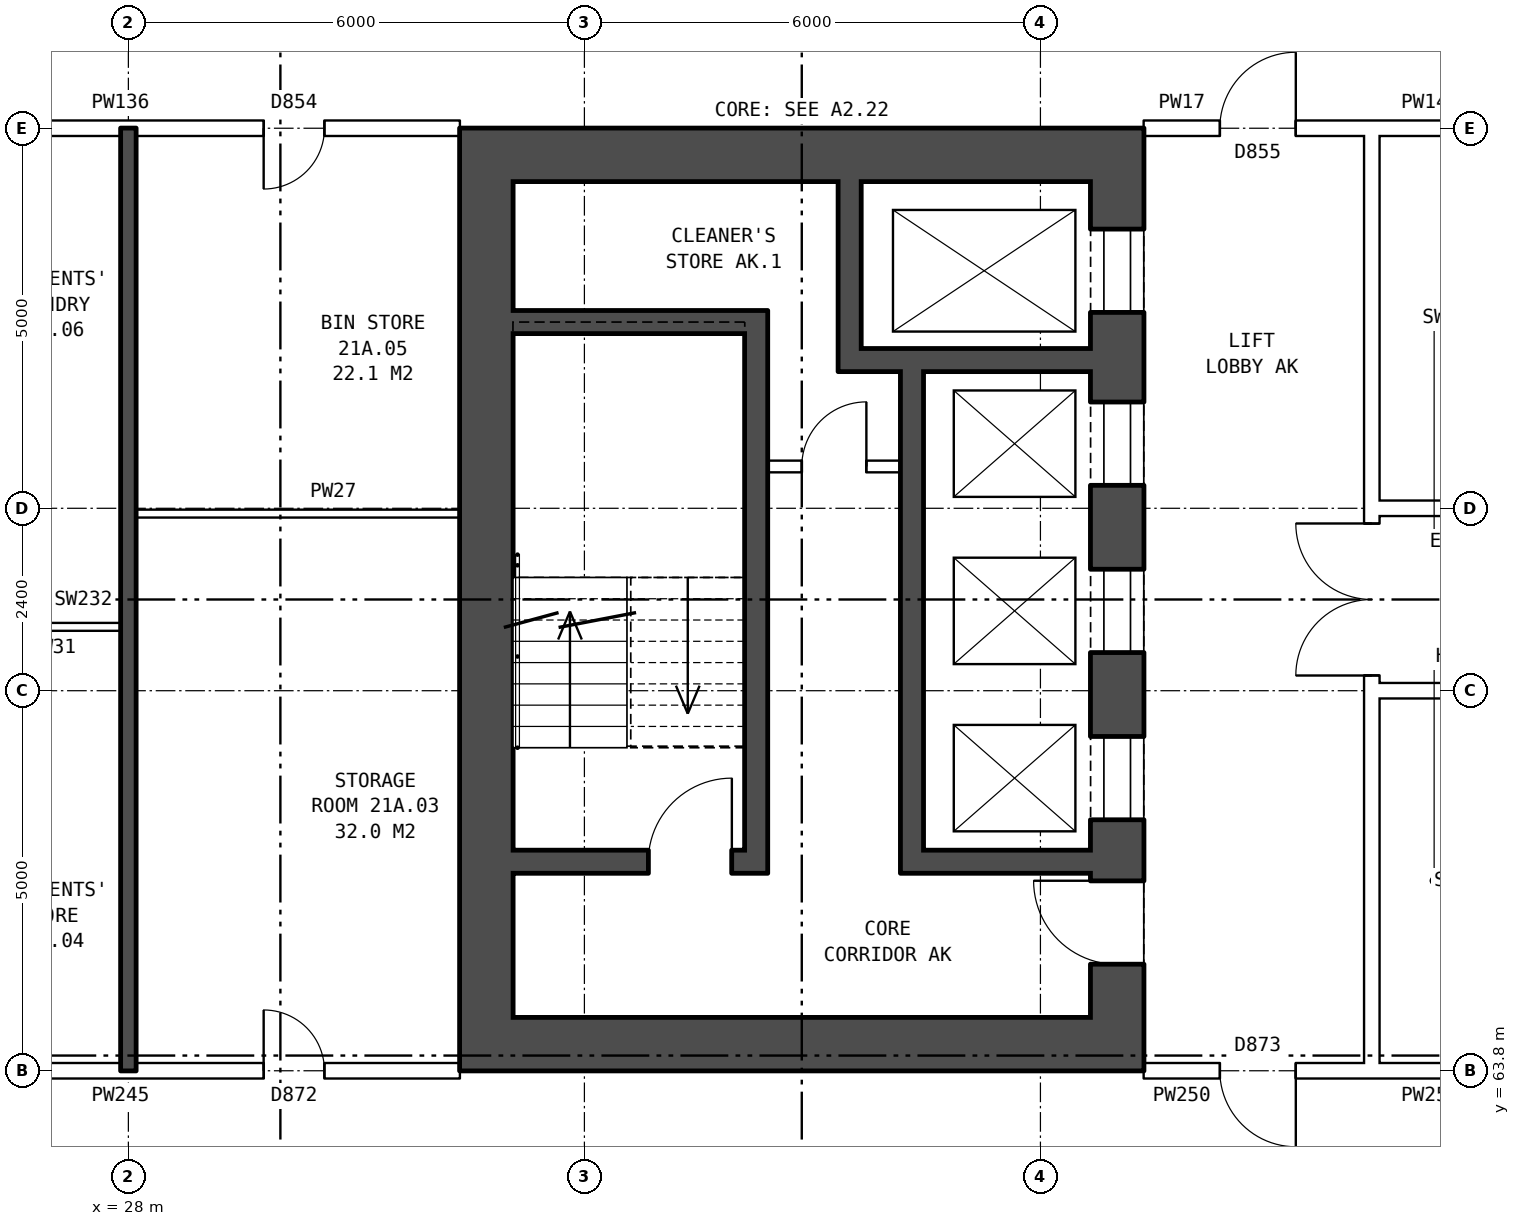
"""IFC4 building model, lengths in metres.
Left out: names, types, materials, properties, quantities, classifications, styles, units other than length and angle.
Written with IfcOpenShell. Run it as: python <this file> out.ifc"""

import sys

from ifc_helpers import new_model, si_unit, direction, frame, frame_2d, origin, place, context, subcontext, project, spatial, rectangle, extrude, element, fill, save


model = new_model("IFC4")
c1 = context("Model", 3, precision=1e-05, world=origin(), true_north=direction((0.0, 1.0)))
c2 = subcontext(c1, "Body", "Model", "MODEL_VIEW")
j1 = project(units=[si_unit("LENGTHUNIT", "METRE"), si_unit("PLANEANGLEUNIT", "RADIAN")], contexts=[c1])
p1 = place(None, origin())
s1 = spatial("IfcSite", under=j1, at=p1, CompositionType="ELEMENT")
p2 = place(p1, origin())
s2 = spatial("IfcBuilding", under=s1, at=p2, CompositionType="ELEMENT")
p3 = place(p2, frame((0.0, 0.0, 77.8)))
s3 = spatial("IfcBuildingStorey", under=s2, at=p3, CompositionType="ELEMENT", Elevation=77.8)
p4 = place(p3, frame((41.01, 75.5, 0.0), z_axis=(0.0, 0.0, 1.0), x_axis=(0.0, -1.0, 0.0)))
e1 = element("IfcWall", 1, at=p4, inside=s3, PredefinedType="SHEAR", context=c2, shape_type="SweptSolid", body=[
    extrude(rectangle(XDim=11.0, YDim=0.7, at=frame_2d((5.5, 0.0))), origin(), (0.0, 0.0, 1.0), 2.85),
])
p5 = place(p4, frame((0.625, 0.0, 0.0)))
e2 = element("IfcOpeningElement", 2, at=p5, cuts=e1, PredefinedType="OPENING", context=c2, shape_type="SweptSolid", body=[
    extrude(rectangle(XDim=1.1, YDim=2.1, at=frame_2d((0.55, 1.05))), frame((0.0, 0.36, 0.0), z_axis=(0.0, -1.0, 0.0), x_axis=(1.0, 0.0, 0.0)), (0.0, 0.0, 1.0), 0.72),
])
p6 = place(p4, frame((2.9, 0.0, 0.0)))
e3 = element("IfcOpeningElement", 3, at=p6, cuts=e1, PredefinedType="OPENING", context=c2, shape_type="SweptSolid", body=[
    extrude(rectangle(XDim=1.1, YDim=2.1, at=frame_2d((0.55, 1.05))), frame((0.0, 0.36, 0.0), z_axis=(0.0, -1.0, 0.0), x_axis=(1.0, 0.0, 0.0)), (0.0, 0.0, 1.0), 0.72),
])
p7 = place(p4, frame((5.1, 0.0, 0.0)))
e4 = element("IfcOpeningElement", 4, at=p7, cuts=e1, PredefinedType="OPENING", context=c2, shape_type="SweptSolid", body=[
    extrude(rectangle(XDim=1.1, YDim=2.1, at=frame_2d((0.55, 1.05))), frame((0.0, 0.36, 0.0), z_axis=(0.0, -1.0, 0.0), x_axis=(1.0, 0.0, 0.0)), (0.0, 0.0, 1.0), 0.72),
])
p8 = place(p4, frame((7.3, 0.0, 0.0)))
e5 = element("IfcOpeningElement", 5, at=p8, cuts=e1, PredefinedType="OPENING", context=c2, shape_type="SweptSolid", body=[
    extrude(rectangle(XDim=1.1, YDim=2.1, at=frame_2d((0.55, 1.05))), frame((0.0, 0.36, 0.0), z_axis=(0.0, -1.0, 0.0), x_axis=(1.0, 0.0, 0.0)), (0.0, 0.0, 1.0), 0.72),
])
p9 = place(p4, frame((9.2, 0.0, 0.0)))
e6 = element("IfcOpeningElement", 6, at=p9, cuts=e1, PredefinedType="OPENING", context=c2, shape_type="SweptSolid", body=[
    extrude(rectangle(XDim=1.1, YDim=2.1, at=frame_2d((0.55, 1.05))), frame((0.0, 0.36, 0.0), z_axis=(0.0, -1.0, 0.0), x_axis=(1.0, 0.0, 0.0)), (0.0, 0.0, 1.0), 0.72),
])
p10 = place(p3, frame((32.71, 75.5, 0.0), z_axis=(0.0, 0.0, 1.0), x_axis=(0.0, -1.0, 0.0)))
e7 = element("IfcWall", 7, at=p10, inside=s3, PredefinedType="SHEAR", context=c2, shape_type="SweptSolid", body=[
    extrude(rectangle(XDim=11.0, YDim=0.7, at=frame_2d((5.5, 0.0))), origin(), (0.0, 0.0, 1.0), 2.85),
])
for number, where, z_axis, x_axis in (
    (8, (41.36, 75.85, 0.0), (0.0, 0.0, 1.0), (-1.0, 0.0, 0.0)),
    (9, (41.36, 64.15, 0.0), (0.0, 0.0, 1.0), (-1.0, 0.0, 0.0)),
):
    element("IfcWall", number, at=place(p3, frame(where, z_axis=z_axis, x_axis=x_axis)), inside=s3, PredefinedType="SHEAR", context=c2, shape_type="SweptSolid", body=[
        extrude(rectangle(XDim=9.0, YDim=0.7, at=frame_2d((4.5, 0.0))), origin(), (0.0, 0.0, 1.0), 2.85),
    ])
p11 = place(p3, frame((36.11, 73.65, 0.0), z_axis=(0.0, 0.0, 1.0), x_axis=(-1.0, 0.0, 0.0)))
e10 = element("IfcWall", 10, at=p11, inside=s3, PredefinedType="SHEAR", context=c2, shape_type="SweptSolid", body=[
    extrude(rectangle(XDim=3.05, YDim=0.3, at=frame_2d((1.525, 0.0))), origin(), (0.0, 0.0, 1.0), 2.85),
])
p12 = place(p3, frame((40.66, 73.15, 0.0), z_axis=(0.0, 0.0, 1.0), x_axis=(-1.0, 0.0, 0.0)))
e11 = element("IfcWall", 11, at=p12, inside=s3, PredefinedType="SHEAR", context=c2, shape_type="SweptSolid", body=[
    extrude(rectangle(XDim=3.32, YDim=0.3, at=frame_2d((1.66, 0.0))), origin(), (0.0, 0.0, 1.0), 2.85),
])
p13 = place(p3, frame((38.16, 71.75, 0.0), z_axis=(0.0, 0.0, 1.0), x_axis=(-1.0, 0.0, 0.0)))
e12 = element("IfcWall", 12, at=p13, inside=s3, PredefinedType="PARTITIONING", context=c2, shape_type="SweptSolid", body=[
    extrude(rectangle(XDim=1.75, YDim=0.15, at=frame_2d((0.875, 0.0))), origin(), (0.0, 0.0, 1.0), 2.85),
])
p14 = place(p13, frame((0.45, 0.0, 0.0)))
e13 = element("IfcOpeningElement", 13, at=p14, cuts=e12, PredefinedType="OPENING", context=c2, shape_type="SweptSolid", body=[
    extrude(rectangle(XDim=0.85, YDim=2.1, at=frame_2d((0.425, 1.05))), frame((0.0, 0.085, 0.0), z_axis=(0.0, -1.0, 0.0), x_axis=(1.0, 0.0, 0.0)), (0.0, 0.0, 1.0), 0.17),
])
p15 = place(p3, frame((40.66, 66.55, 0.0), z_axis=(0.0, 0.0, 1.0), x_axis=(-1.0, 0.0, 0.0)))
e14 = element("IfcWall", 14, at=p15, inside=s3, PredefinedType="SHEAR", context=c2, shape_type="SweptSolid", body=[
    extrude(rectangle(XDim=2.2, YDim=0.3, at=frame_2d((1.1, 0.0))), origin(), (0.0, 0.0, 1.0), 2.85),
])
p16 = place(p3, frame((36.11, 66.55, 0.0), z_axis=(0.0, 0.0, 1.0), x_axis=(-1.0, 0.0, 0.0)))
e15 = element("IfcWall", 15, at=p16, inside=s3, PredefinedType="SHEAR", context=c2, shape_type="SweptSolid", body=[
    extrude(rectangle(XDim=3.05, YDim=0.3, at=frame_2d((1.525, 0.0))), origin(), (0.0, 0.0, 1.0), 2.85),
])
p17 = place(p16, frame((0.17, 0.0, 0.0)))
e16 = element("IfcOpeningElement", 16, at=p17, cuts=e15, PredefinedType="OPENING", context=c2, shape_type="SweptSolid", body=[
    extrude(rectangle(XDim=1.1, YDim=2.1, at=frame_2d((0.55, 1.05))), frame((0.0, 0.16, 0.0), z_axis=(0.0, -1.0, 0.0), x_axis=(1.0, 0.0, 0.0)), (0.0, 0.0, 1.0), 0.32),
])
p18 = place(p3, frame((38.31, 73.0, 0.0), z_axis=(0.0, 0.0, 1.0), x_axis=(0.0, -1.0, 0.0)))
e17 = element("IfcWall", 17, at=p18, inside=s3, PredefinedType="SHEAR", context=c2, shape_type="SweptSolid", body=[
    extrude(rectangle(XDim=6.6, YDim=0.3, at=frame_2d((3.3, 0.0))), origin(), (0.0, 0.0, 1.0), 2.85),
])
p19 = place(p3, frame((37.49, 75.5, 0.0), z_axis=(0.0, 0.0, 1.0), x_axis=(0.0, -1.0, 0.0)))
e18 = element("IfcWall", 18, at=p19, inside=s3, PredefinedType="SHEAR", context=c2, shape_type="SweptSolid", body=[
    extrude(rectangle(XDim=2.2, YDim=0.3, at=frame_2d((1.1, 0.0))), origin(), (0.0, 0.0, 1.0), 2.85),
])
p20 = place(p3, frame((36.26, 73.8, 0.0), z_axis=(0.0, 0.0, 1.0), x_axis=(0.0, -1.0, 0.0)))
e19 = element("IfcWall", 19, at=p20, inside=s3, PredefinedType="SHEAR", context=c2, shape_type="SweptSolid", body=[
    extrude(rectangle(XDim=7.4, YDim=0.3, at=frame_2d((3.7, 0.0))), origin(), (0.0, 0.0, 1.0), 2.85),
])
p21 = place(p3, frame((44.36, 63.9, 0.0), z_axis=(0.0, 0.0, 1.0), x_axis=(0.0, 1.0, 0.0)))
e20 = element("IfcWall", 20, at=p21, inside=s3, PredefinedType="PARTITIONING", context=c2, shape_type="SweptSolid", body=[
    extrude(rectangle(XDim=12.2, YDim=0.2, at=frame_2d((6.1, 0.0))), origin(), (0.0, 0.0, 1.0), 2.85),
])
p22 = place(p21, frame((5.1, 0.0, 0.0)))
e21 = element("IfcOpeningElement", 21, at=p22, cuts=e20, PredefinedType="OPENING", context=c2, shape_type="SweptSolid", body=[
    extrude(rectangle(XDim=2.0, YDim=2.1, at=frame_2d((1.0, 1.05))), frame((0.0, 0.11, 0.0), z_axis=(0.0, -1.0, 0.0), x_axis=(1.0, 0.0, 0.0)), (0.0, 0.0, 1.0), 0.22),
])
p23 = place(p3, frame((26.01, 63.8, 0.0), z_axis=(0.0, 0.0, 1.0), x_axis=(1.0, 0.0, 0.0)))
e22 = element("IfcWall", 22, at=p23, inside=s3, PredefinedType="PARTITIONING", context=c2, shape_type="SweptSolid", body=[
    extrude(rectangle(XDim=6.35, YDim=0.2, at=frame_2d((3.175, 0.0))), origin(), (0.0, 0.0, 1.0), 2.85),
])
p24 = place(p23, frame((3.77, 0.0, 0.0)))
e23 = element("IfcOpeningElement", 23, at=p24, cuts=e22, PredefinedType="OPENING", context=c2, shape_type="SweptSolid", body=[
    extrude(rectangle(XDim=0.8, YDim=2.1, at=frame_2d((0.4, 1.05))), frame((0.0, 0.11, 0.0), z_axis=(0.0, -1.0, 0.0), x_axis=(1.0, 0.0, 0.0)), (0.0, 0.0, 1.0), 0.22),
])
p25 = place(p3, frame((41.36, 63.8, 0.0), z_axis=(0.0, 0.0, 1.0), x_axis=(1.0, 0.0, 0.0)))
e24 = element("IfcWall", 24, at=p25, inside=s3, PredefinedType="PARTITIONING", context=c2, shape_type="SweptSolid", body=[
    extrude(rectangle(XDim=3.0, YDim=0.2, at=frame_2d((1.5, 0.0))), origin(), (0.0, 0.0, 1.0), 2.85),
])
p26 = place(p25, frame((1.0, 0.0, 0.0)))
e25 = element("IfcOpeningElement", 25, at=p26, cuts=e24, PredefinedType="OPENING", context=c2, shape_type="SweptSolid", body=[
    extrude(rectangle(XDim=1.0, YDim=2.1, at=frame_2d((0.5, 1.05))), frame((0.0, 0.11, 0.0), z_axis=(0.0, -1.0, 0.0), x_axis=(1.0, 0.0, 0.0)), (0.0, 0.0, 1.0), 0.22),
])
p27 = place(p3, frame((44.36, 63.8, 0.0), z_axis=(0.0, 0.0, 1.0), x_axis=(1.0, 0.0, 0.0)))
e26 = element("IfcWall", 26, at=p27, inside=s3, PredefinedType="PARTITIONING", context=c2, shape_type="SweptSolid", body=[
    extrude(rectangle(XDim=1.54, YDim=0.2, at=frame_2d((0.77, 0.0))), origin(), (0.0, 0.0, 1.0), 2.85),
])
p28 = place(p3, frame((44.36, 68.8, 0.0), z_axis=(0.0, 0.0, 1.0), x_axis=(1.0, 0.0, 0.0)))
e27 = element("IfcWall", 27, at=p28, inside=s3, PredefinedType="PARTITIONING", context=c2, shape_type="SweptSolid", body=[
    extrude(rectangle(XDim=19.28, YDim=0.2, at=frame_2d((9.64, 0.0))), origin(), (0.0, 0.0, 1.0), 2.85),
])
p29 = place(p28, frame((14.64, 0.0, 0.0)))
e28 = element("IfcOpeningElement", 28, at=p29, cuts=e27, PredefinedType="OPENING", context=c2, shape_type="SweptSolid", body=[
    extrude(rectangle(XDim=1.0, YDim=2.1, at=frame_2d((0.5, 1.05))), frame((0.0, 0.11, 0.0), z_axis=(0.0, -1.0, 0.0), x_axis=(1.0, 0.0, 0.0)), (0.0, 0.0, 1.0), 0.22),
])
p30 = place(p28, frame((5.64, 0.0, 0.0)))
e29 = element("IfcOpeningElement", 29, at=p30, cuts=e27, PredefinedType="OPENING", context=c2, shape_type="SweptSolid", body=[
    extrude(rectangle(XDim=1.0, YDim=2.1, at=frame_2d((0.5, 1.05))), frame((0.0, 0.11, 0.0), z_axis=(0.0, -1.0, 0.0), x_axis=(1.0, 0.0, 0.0)), (0.0, 0.0, 1.0), 0.22),
])
p31 = place(p3, frame((26.11, 69.64, 0.0), z_axis=(0.0, 0.0, 1.0), x_axis=(1.0, 0.0, 0.0)))
e30 = element("IfcWall", 30, at=p31, inside=s3, PredefinedType="PARTITIONING", context=c2, shape_type="SweptSolid", body=[
    extrude(rectangle(XDim=1.79, YDim=0.1, at=frame_2d((0.895, 0.0))), origin(), (0.0, 0.0, 1.0), 2.85),
])
p32 = place(p3, frame((28.1, 71.13, 0.0), z_axis=(0.0, 0.0, 1.0), x_axis=(1.0, 0.0, 0.0)))
e31 = element("IfcWall", 31, at=p32, inside=s3, PredefinedType="PARTITIONING", context=c2, shape_type="SweptSolid", body=[
    extrude(rectangle(XDim=4.26, YDim=0.1, at=frame_2d((2.13, 0.0))), origin(), (0.0, 0.0, 1.0), 2.85),
])
p33 = place(p3, frame((44.36, 71.2, 0.0), z_axis=(0.0, 0.0, 1.0), x_axis=(1.0, 0.0, 0.0)))
e32 = element("IfcWall", 32, at=p33, inside=s3, PredefinedType="PARTITIONING", context=c2, shape_type="SweptSolid", body=[
    extrude(rectangle(XDim=19.28, YDim=0.2, at=frame_2d((9.64, 0.0))), origin(), (0.0, 0.0, 1.0), 2.85),
])
p34 = place(p33, frame((14.64, 0.0, 0.0)))
e33 = element("IfcOpeningElement", 33, at=p34, cuts=e32, PredefinedType="OPENING", context=c2, shape_type="SweptSolid", body=[
    extrude(rectangle(XDim=1.0, YDim=2.1, at=frame_2d((0.5, 1.05))), frame((0.0, 0.11, 0.0), z_axis=(0.0, -1.0, 0.0), x_axis=(1.0, 0.0, 0.0)), (0.0, 0.0, 1.0), 0.22),
])
p35 = place(p33, frame((5.64, 0.0, 0.0)))
e34 = element("IfcOpeningElement", 34, at=p35, cuts=e32, PredefinedType="OPENING", context=c2, shape_type="SweptSolid", body=[
    extrude(rectangle(XDim=1.0, YDim=2.1, at=frame_2d((0.5, 1.05))), frame((0.0, 0.11, 0.0), z_axis=(0.0, -1.0, 0.0), x_axis=(1.0, 0.0, 0.0)), (0.0, 0.0, 1.0), 0.22),
])
p36 = place(p3, frame((26.01, 76.2, 0.0), z_axis=(0.0, 0.0, 1.0), x_axis=(1.0, 0.0, 0.0)))
e35 = element("IfcWall", 35, at=p36, inside=s3, PredefinedType="PARTITIONING", context=c2, shape_type="SweptSolid", body=[
    extrude(rectangle(XDim=6.35, YDim=0.2, at=frame_2d((3.175, 0.0))), origin(), (0.0, 0.0, 1.0), 2.85),
])
p37 = place(p36, frame((3.77, 0.0, 0.0)))
e36 = element("IfcOpeningElement", 36, at=p37, cuts=e35, PredefinedType="OPENING", context=c2, shape_type="SweptSolid", body=[
    extrude(rectangle(XDim=0.8, YDim=2.1, at=frame_2d((0.4, 1.05))), frame((0.0, 0.11, 0.0), z_axis=(0.0, -1.0, 0.0), x_axis=(1.0, 0.0, 0.0)), (0.0, 0.0, 1.0), 0.22),
])
p38 = place(p3, frame((41.36, 76.2, 0.0), z_axis=(0.0, 0.0, 1.0), x_axis=(1.0, 0.0, 0.0)))
e37 = element("IfcWall", 37, at=p38, inside=s3, PredefinedType="PARTITIONING", context=c2, shape_type="SweptSolid", body=[
    extrude(rectangle(XDim=3.0, YDim=0.2, at=frame_2d((1.5, 0.0))), origin(), (0.0, 0.0, 1.0), 2.85),
])
p39 = place(p38, frame((1.0, 0.0, 0.0)))
e38 = element("IfcOpeningElement", 38, at=p39, cuts=e37, PredefinedType="OPENING", context=c2, shape_type="SweptSolid", body=[
    extrude(rectangle(XDim=1.0, YDim=2.1, at=frame_2d((0.5, 1.05))), frame((0.0, 0.11, 0.0), z_axis=(0.0, -1.0, 0.0), x_axis=(1.0, 0.0, 0.0)), (0.0, 0.0, 1.0), 0.22),
])
p40 = place(p3, frame((44.36, 76.2, 0.0), z_axis=(0.0, 0.0, 1.0), x_axis=(1.0, 0.0, 0.0)))
e39 = element("IfcWall", 39, at=p40, inside=s3, PredefinedType="PARTITIONING", context=c2, shape_type="SweptSolid", body=[
    extrude(rectangle(XDim=1.54, YDim=0.2, at=frame_2d((0.77, 0.0))), origin(), (0.0, 0.0, 1.0), 2.85),
])
p41 = place(p3, frame((28.0, 63.8, 0.0), z_axis=(0.0, 0.0, 1.0), x_axis=(0.0, 1.0, 0.0)))
e40 = element("IfcWall", 40, at=p41, inside=s3, PredefinedType="SOLIDWALL", context=c2, shape_type="SweptSolid", body=[
    extrude(rectangle(XDim=12.4, YDim=0.2, at=frame_2d((6.2, 0.0))), origin(), (0.0, 0.0, 1.0), 2.85),
])
p42 = place(p5, origin())
e41 = element("IfcDoor", 41, at=p42, inside=s3, OperationType="DOUBLE_DOOR_SLIDING", PredefinedType="DOOR", context=c2, shape_type="SweptSolid", body=[
    extrude(rectangle(XDim=1.1, YDim=2.1, at=frame_2d((0.55, 1.05))), frame((0.0, -0.285, 0.0), z_axis=(0.0, -1.0, 0.0), x_axis=(1.0, 0.0, 0.0)), (0.0, 0.0, 1.0), 0.05),
])
fill(e2, e41)
p43 = place(p6, origin())
e42 = element("IfcDoor", 42, at=p43, inside=s3, OperationType="DOUBLE_DOOR_SLIDING", PredefinedType="DOOR", context=c2, shape_type="SweptSolid", body=[
    extrude(rectangle(XDim=1.1, YDim=2.1, at=frame_2d((0.55, 1.05))), frame((0.0, -0.285, 0.0), z_axis=(0.0, -1.0, 0.0), x_axis=(1.0, 0.0, 0.0)), (0.0, 0.0, 1.0), 0.05),
])
fill(e3, e42)
p44 = place(p7, origin())
e43 = element("IfcDoor", 43, at=p44, inside=s3, OperationType="DOUBLE_DOOR_SLIDING", PredefinedType="DOOR", context=c2, shape_type="SweptSolid", body=[
    extrude(rectangle(XDim=1.1, YDim=2.1, at=frame_2d((0.55, 1.05))), frame((0.0, -0.285, 0.0), z_axis=(0.0, -1.0, 0.0), x_axis=(1.0, 0.0, 0.0)), (0.0, 0.0, 1.0), 0.05),
])
fill(e4, e43)
p45 = place(p8, origin())
e44 = element("IfcDoor", 44, at=p45, inside=s3, OperationType="DOUBLE_DOOR_SLIDING", PredefinedType="DOOR", context=c2, shape_type="SweptSolid", body=[
    extrude(rectangle(XDim=1.1, YDim=2.1, at=frame_2d((0.55, 1.05))), frame((0.0, -0.285, 0.0), z_axis=(0.0, -1.0, 0.0), x_axis=(1.0, 0.0, 0.0)), (0.0, 0.0, 1.0), 0.05),
])
fill(e5, e44)
p46 = place(p9, frame((1.1, 0.0, 0.0), z_axis=(0.0, 0.0, 1.0), x_axis=(-1.0, 0.0, 0.0)))
e45 = element("IfcDoor", 45, at=p46, inside=s3, OperationType="SINGLE_SWING_RIGHT", PredefinedType="DOOR", context=c2, shape_type="SweptSolid", body=[
    extrude(rectangle(XDim=1.1, YDim=2.1, at=frame_2d((0.55, 1.05))), frame((0.0, 0.335, 0.0), z_axis=(0.0, -1.0, 0.0), x_axis=(1.0, 0.0, 0.0)), (0.0, 0.0, 1.0), 0.05),
])
fill(e6, e45)
p47 = place(p17, frame((1.1, 0.0, 0.0), z_axis=(0.0, 0.0, 1.0), x_axis=(-1.0, 0.0, 0.0)))
e46 = element("IfcDoor", 46, at=p47, inside=s3, OperationType="SINGLE_SWING_RIGHT", PredefinedType="DOOR", context=c2, shape_type="SweptSolid", body=[
    extrude(rectangle(XDim=1.1, YDim=2.1, at=frame_2d((0.55, 1.05))), frame((0.0, 0.025, 0.0), z_axis=(0.0, -1.0, 0.0), x_axis=(1.0, 0.0, 0.0)), (0.0, 0.0, 1.0), 0.05),
])
fill(e16, e46)
p48 = place(p14, frame((0.85, 0.0, 0.0), z_axis=(0.0, 0.0, 1.0), x_axis=(-1.0, 0.0, 0.0)))
e47 = element("IfcDoor", 47, at=p48, inside=s3, OperationType="SINGLE_SWING_RIGHT", PredefinedType="DOOR", context=c2, shape_type="SweptSolid", body=[
    extrude(rectangle(XDim=0.85, YDim=2.1, at=frame_2d((0.425, 1.05))), frame((0.0, 0.025, 0.0), z_axis=(0.0, -1.0, 0.0), x_axis=(1.0, 0.0, 0.0)), (0.0, 0.0, 1.0), 0.05),
])
fill(e13, e47)
p49 = place(p22, origin())
e48 = element("IfcDoor", 48, at=p49, inside=s3, OperationType="DOUBLE_DOOR_SINGLE_SWING", PredefinedType="DOOR", context=c2, shape_type="SweptSolid", body=[
    extrude(rectangle(XDim=2.0, YDim=2.1, at=frame_2d((1.0, 1.05))), frame((0.0, 0.025, 0.0), z_axis=(0.0, -1.0, 0.0), x_axis=(1.0, 0.0, 0.0)), (0.0, 0.0, 1.0), 0.05),
])
fill(e21, e48)
p50 = place(p26, frame((1.0, 0.0, 0.0), z_axis=(0.0, 0.0, 1.0), x_axis=(-1.0, 0.0, 0.0)))
e49 = element("IfcDoor", 49, at=p50, inside=s3, OperationType="SINGLE_SWING_LEFT", PredefinedType="DOOR", context=c2, shape_type="SweptSolid", body=[
    extrude(rectangle(XDim=1.0, YDim=2.1, at=frame_2d((0.5, 1.05))), frame((0.0, 0.025, 0.0), z_axis=(0.0, -1.0, 0.0), x_axis=(1.0, 0.0, 0.0)), (0.0, 0.0, 1.0), 0.05),
])
fill(e25, e49)
p51 = place(p39, origin())
e50 = element("IfcDoor", 50, at=p51, inside=s3, OperationType="SINGLE_SWING_RIGHT", PredefinedType="DOOR", context=c2, shape_type="SweptSolid", body=[
    extrude(rectangle(XDim=1.0, YDim=2.1, at=frame_2d((0.5, 1.05))), frame((0.0, 0.025, 0.0), z_axis=(0.0, -1.0, 0.0), x_axis=(1.0, 0.0, 0.0)), (0.0, 0.0, 1.0), 0.05),
])
fill(e38, e50)
p52 = place(p24, origin())
e51 = element("IfcDoor", 51, at=p52, inside=s3, OperationType="SINGLE_SWING_LEFT", PredefinedType="DOOR", context=c2, shape_type="SweptSolid", body=[
    extrude(rectangle(XDim=0.8, YDim=2.1, at=frame_2d((0.4, 1.05))), frame((0.0, 0.025, 0.0), z_axis=(0.0, -1.0, 0.0), x_axis=(1.0, 0.0, 0.0)), (0.0, 0.0, 1.0), 0.05),
])
fill(e23, e51)
p53 = place(p37, frame((0.8, 0.0, 0.0), z_axis=(0.0, 0.0, 1.0), x_axis=(-1.0, 0.0, 0.0)))
e52 = element("IfcDoor", 52, at=p53, inside=s3, OperationType="SINGLE_SWING_RIGHT", PredefinedType="DOOR", context=c2, shape_type="SweptSolid", body=[
    extrude(rectangle(XDim=0.8, YDim=2.1, at=frame_2d((0.4, 1.05))), frame((0.0, 0.025, 0.0), z_axis=(0.0, -1.0, 0.0), x_axis=(1.0, 0.0, 0.0)), (0.0, 0.0, 1.0), 0.05),
])
fill(e36, e52)
save(model, sys.argv[1])
